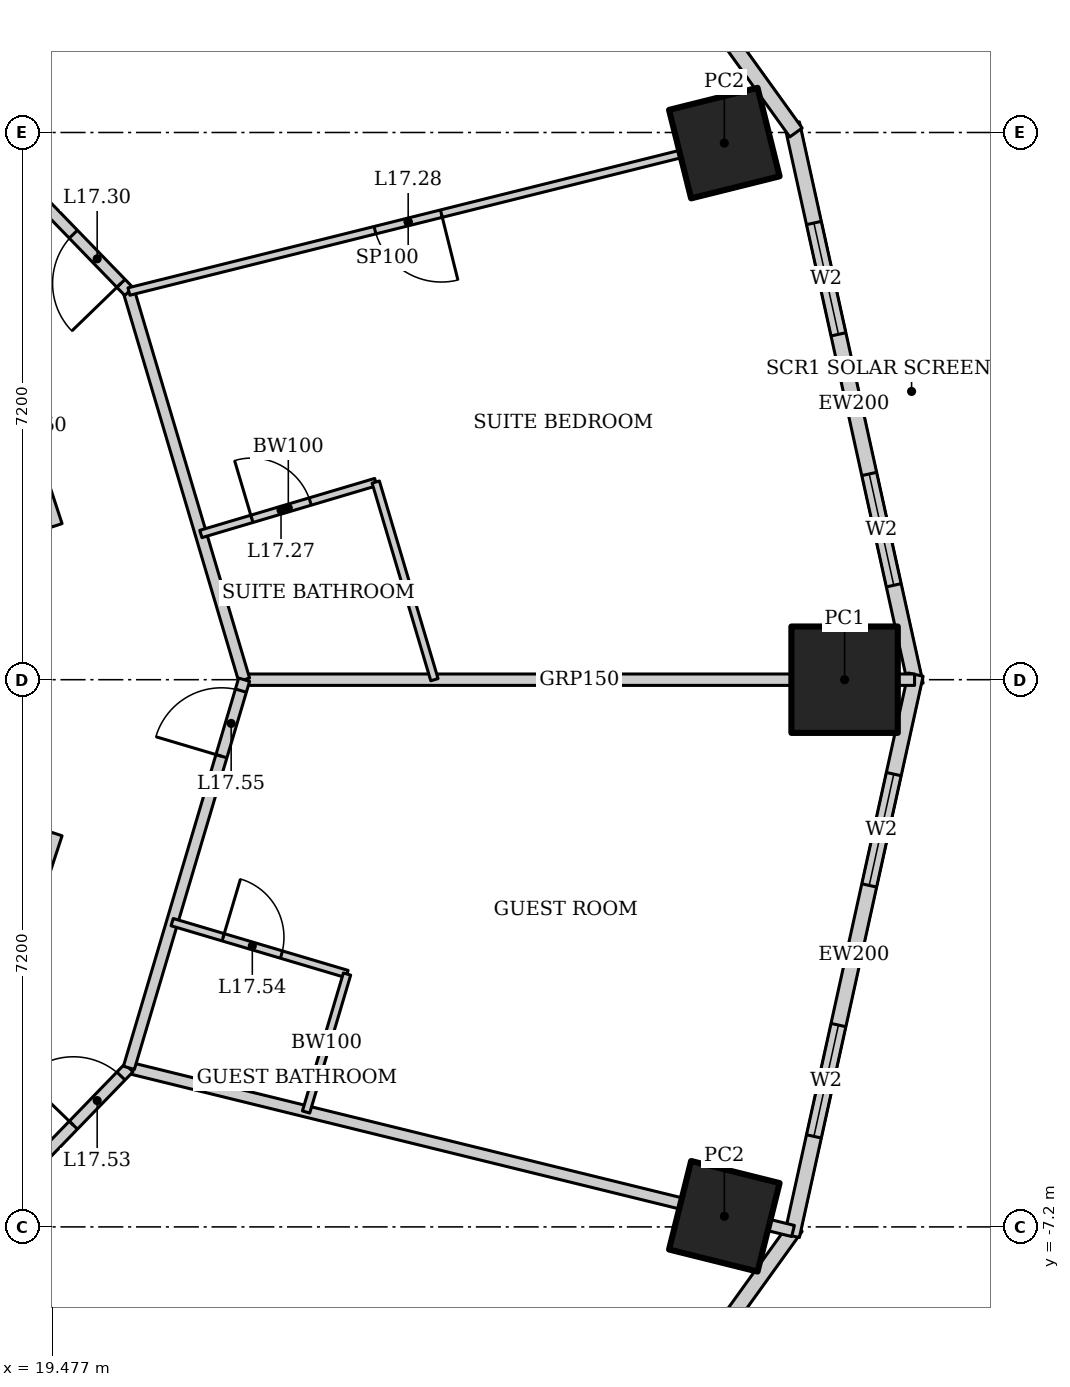
"""IFC4 building model, lengths in metres.
Left out: names, types, materials, properties, quantities, classifications, styles, units other than length and angle.
Written with IfcOpenShell. Run it as: python <this file> out.ifc"""

import sys

from ifc_helpers import new_model, si_unit, direction, frame, frame_2d, origin, origin_2d, place, context, subcontext, project, spatial, rectangle, hollow_rectangle, extrude, element, fill, save


model = new_model("IFC4")
c1 = context("Model", 3, precision=1e-05, world=origin(), true_north=direction((0.0, 1.0)))
c2 = subcontext(c1, "Body", "Model", "MODEL_VIEW")
j1 = project(units=[si_unit("LENGTHUNIT", "METRE"), si_unit("PLANEANGLEUNIT", "RADIAN")], contexts=[c1])
p1 = place(None, origin())
s1 = spatial("IfcSite", under=j1, at=p1, CompositionType="ELEMENT")
p2 = place(p1, origin())
s2 = spatial("IfcBuilding", under=s1, at=p2, CompositionType="ELEMENT")
p3 = place(p2, frame((0.0, 0.0, 76.6)))
s3 = spatial("IfcBuildingStorey", under=s2, at=p3, CompositionType="ELEMENT", Elevation=76.6)
p4 = place(p3, frame((29.9, 0.0, 0.0), z_axis=(0.0, 0.0, 1.0), x_axis=(1.0, 0.0, 0.0)))
e1 = element("IfcColumn", 1, at=p4, inside=s3, PredefinedType="COLUMN", context=c2, shape_type="SweptSolid", body=[
    extrude(hollow_rectangle(XDim=1.4, YDim=1.4, WallThickness=0.1, at=origin_2d()), origin(), (0.0, 0.0, 1.0), 3.6),
])
for number, where, z_axis, x_axis in (
    (2, (28.318, 7.06, 0.0), (0.0, 0.0, 1.0), (0.97, 0.242, 0.0)),
    (3, (28.318, -7.06, 0.0), (0.0, 0.0, 1.0), (0.242, 0.97, 0.0)),
):
    element("IfcColumn", number, at=place(p3, frame(where, z_axis=z_axis, x_axis=x_axis)), inside=s3, PredefinedType="COLUMN", context=c2, shape_type="SweptSolid", body=[
        extrude(hollow_rectangle(XDim=1.2, YDim=1.2, WallThickness=0.1, at=origin_2d()), origin(), (0.0, 0.0, 1.0), 3.6),
    ])
p5 = place(p3, frame((30.835, -0.067, 0.0), z_axis=(0.0, 0.0, 1.0), x_axis=(-0.215238065514, 0.976561608478, 0.0)))
e4 = element("IfcWall", 4, at=p5, inside=s3, PredefinedType="SOLIDWALL", context=c2, shape_type="SweptSolid", body=[
    extrude(rectangle(XDim=7.562, YDim=0.2, at=frame_2d((3.781, 0.0))), origin(), (0.0, 0.0, 1.0), 3.45),
])
p6 = place(p5, frame((1.341, 0.0, 0.5)))
e5 = element("IfcOpeningElement", 5, at=p6, cuts=e4, PredefinedType="OPENING", context=c2, shape_type="SweptSolid", body=[
    extrude(rectangle(XDim=1.5, YDim=2.2, at=frame_2d((0.75, 1.1))), frame((0.0, 0.11, 0.0), z_axis=(0.0, -1.0, 0.0), x_axis=(1.0, 0.0, 0.0)), (0.0, 0.0, 1.0), 0.22),
])
p7 = place(p5, frame((4.722, 0.0, 0.5)))
e6 = element("IfcOpeningElement", 6, at=p7, cuts=e4, PredefinedType="OPENING", context=c2, shape_type="SweptSolid", body=[
    extrude(rectangle(XDim=1.5, YDim=2.2, at=frame_2d((0.75, 1.1))), frame((0.0, 0.11, 0.0), z_axis=(0.0, -1.0, 0.0), x_axis=(1.0, 0.0, 0.0)), (0.0, 0.0, 1.0), 0.22),
])
p8 = place(p3, frame((29.26, 7.2, 0.0), z_axis=(0.0, 0.0, 1.0), x_axis=(-0.583937613703, 0.811798536155, 0.0)))
e7 = element("IfcWall", 7, at=p8, inside=s3, PredefinedType="SOLIDWALL", context=c2, shape_type="SweptSolid", body=[
    extrude(rectangle(XDim=8.323, YDim=0.2, at=frame_2d((4.162, 0.0))), origin(), (0.0, 0.0, 1.0), 3.45),
])
p9 = place(p8, frame((1.531, 0.0, 0.5)))
e8 = element("IfcOpeningElement", 8, at=p9, cuts=e7, PredefinedType="OPENING", context=c2, shape_type="SweptSolid", body=[
    extrude(rectangle(XDim=1.5, YDim=2.2, at=frame_2d((0.75, 1.1))), frame((0.0, 0.11, 0.0), z_axis=(0.0, -1.0, 0.0), x_axis=(1.0, 0.0, 0.0)), (0.0, 0.0, 1.0), 0.22),
])
p10 = place(p8, frame((5.292, 0.0, 0.5)))
e9 = element("IfcOpeningElement", 9, at=p10, cuts=e7, PredefinedType="OPENING", context=c2, shape_type="SweptSolid", body=[
    extrude(rectangle(XDim=1.5, YDim=2.2, at=frame_2d((0.75, 1.1))), frame((0.0, 0.11, 0.0), z_axis=(0.0, -1.0, 0.0), x_axis=(1.0, 0.0, 0.0)), (0.0, 0.0, 1.0), 0.22),
])
p11 = place(p3, frame((24.4, -13.957, 0.0), z_axis=(0.0, 0.0, 1.0), x_axis=(0.583937613703, 0.811798536155, 0.0)))
e10 = element("IfcWall", 10, at=p11, inside=s3, PredefinedType="SOLIDWALL", context=c2, shape_type="SweptSolid", body=[
    extrude(rectangle(XDim=8.323, YDim=0.2, at=frame_2d((4.162, 0.0))), origin(), (0.0, 0.0, 1.0), 3.45),
])
p12 = place(p11, frame((1.531, 0.0, 0.5)))
e11 = element("IfcOpeningElement", 11, at=p12, cuts=e10, PredefinedType="OPENING", context=c2, shape_type="SweptSolid", body=[
    extrude(rectangle(XDim=1.5, YDim=2.2, at=frame_2d((0.75, 1.1))), frame((0.0, 0.11, 0.0), z_axis=(0.0, -1.0, 0.0), x_axis=(1.0, 0.0, 0.0)), (0.0, 0.0, 1.0), 0.22),
])
p13 = place(p11, frame((5.292, 0.0, 0.5)))
e12 = element("IfcOpeningElement", 12, at=p13, cuts=e10, PredefinedType="OPENING", context=c2, shape_type="SweptSolid", body=[
    extrude(rectangle(XDim=1.5, YDim=2.2, at=frame_2d((0.75, 1.1))), frame((0.0, 0.11, 0.0), z_axis=(0.0, -1.0, 0.0), x_axis=(1.0, 0.0, 0.0)), (0.0, 0.0, 1.0), 0.22),
])
p14 = place(p3, frame((29.208, -7.318, 0.0), z_axis=(0.0, 0.0, 1.0), x_axis=(0.215238065514, 0.976561608478, 0.0)))
e13 = element("IfcWall", 13, at=p14, inside=s3, PredefinedType="SOLIDWALL", context=c2, shape_type="SweptSolid", body=[
    extrude(rectangle(XDim=7.562, YDim=0.2, at=frame_2d((3.781, 0.0))), origin(), (0.0, 0.0, 1.0), 3.45),
])
p15 = place(p14, frame((1.341, 0.0, 0.5)))
e14 = element("IfcOpeningElement", 14, at=p15, cuts=e13, PredefinedType="OPENING", context=c2, shape_type="SweptSolid", body=[
    extrude(rectangle(XDim=1.5, YDim=2.2, at=frame_2d((0.75, 1.1))), frame((0.0, 0.11, 0.0), z_axis=(0.0, -1.0, 0.0), x_axis=(1.0, 0.0, 0.0)), (0.0, 0.0, 1.0), 0.22),
])
p16 = place(p14, frame((4.722, 0.0, 0.5)))
e15 = element("IfcOpeningElement", 15, at=p16, cuts=e13, PredefinedType="OPENING", context=c2, shape_type="SweptSolid", body=[
    extrude(rectangle(XDim=1.5, YDim=2.2, at=frame_2d((0.75, 1.1))), frame((0.0, 0.11, 0.0), z_axis=(0.0, -1.0, 0.0), x_axis=(1.0, 0.0, 0.0)), (0.0, 0.0, 1.0), 0.22),
])
p17 = place(p3, frame((30.821, 0.0, 0.0), z_axis=(0.0, 0.0, 1.0), x_axis=(-1.0, 0.0, 0.0)))
e16 = element("IfcWall", 16, at=p17, inside=s3, PredefinedType="PARTITIONING", context=c2, shape_type="SweptSolid", body=[
    extrude(rectangle(XDim=8.821, YDim=0.15, at=frame_2d((4.41, 0.0))), origin(), (0.0, 0.0, 1.0), 2.528),
])
p18 = place(p3, frame((29.222, -7.254, 0.0), z_axis=(0.0, 0.0, 1.0), x_axis=(-0.971128703136, 0.238556160989, 0.0)))
e17 = element("IfcWall", 17, at=p18, inside=s3, PredefinedType="PARTITIONING", context=c2, shape_type="SweptSolid", body=[
    extrude(rectangle(XDim=8.998, YDim=0.15, at=frame_2d((4.499, 0.0))), origin(), (0.0, 0.0, 1.0), 2.332),
])
p19 = place(p3, frame((22.0, 0.0, 0.0), z_axis=(0.0, 0.0, 1.0), x_axis=(-0.284584469409, 0.95865096869, 0.0)))
e18 = element("IfcWall", 18, at=p19, inside=s3, PredefinedType="PARTITIONING", context=c2, shape_type="SweptSolid", body=[
    extrude(rectangle(XDim=5.327, YDim=0.15, at=frame_2d((2.664, 0.0))), origin(), (0.0, 0.0, 1.0), 3.45),
])
p20 = place(p3, frame((20.484, 5.107, 0.0), z_axis=(0.0, 0.0, 1.0), x_axis=(-0.695871090686, 0.71816671125, 0.0)))
e19 = element("IfcWall", 19, at=p20, inside=s3, PredefinedType="PARTITIONING", context=c2, shape_type="SweptSolid", body=[
    extrude(rectangle(XDim=5.913, YDim=0.15, at=frame_2d((2.957, 0.0))), origin(), (0.0, 0.0, 1.0), 3.45),
])
p21 = place(p20, frame((0.15, 0.0, 0.0)))
e20 = element("IfcOpeningElement", 20, at=p21, cuts=e19, PredefinedType="OPENING", context=c2, shape_type="SweptSolid", body=[
    extrude(rectangle(XDim=0.9, YDim=2.1, at=frame_2d((0.45, 1.05))), frame((0.0, 0.085, 0.0), z_axis=(0.0, -1.0, 0.0), x_axis=(1.0, 0.0, 0.0)), (0.0, 0.0, 1.0), 0.17),
])
p22 = place(p3, frame((16.369, -9.354, 0.0), z_axis=(0.0, 0.0, 1.0), x_axis=(0.695871090686, 0.71816671125, 0.0)))
e21 = element("IfcWall", 21, at=p22, inside=s3, PredefinedType="PARTITIONING", context=c2, shape_type="SweptSolid", body=[
    extrude(rectangle(XDim=5.913, YDim=0.15, at=frame_2d((2.957, 0.0))), origin(), (0.0, 0.0, 1.0), 3.45),
])
p23 = place(p22, frame((4.863, 0.0, 0.0)))
e22 = element("IfcOpeningElement", 22, at=p23, cuts=e21, PredefinedType="OPENING", context=c2, shape_type="SweptSolid", body=[
    extrude(rectangle(XDim=0.9, YDim=2.1, at=frame_2d((0.45, 1.05))), frame((0.0, 0.085, 0.0), z_axis=(0.0, -1.0, 0.0), x_axis=(1.0, 0.0, 0.0)), (0.0, 0.0, 1.0), 0.17),
])
p24 = place(p3, frame((20.484, -5.107, 0.0), z_axis=(0.0, 0.0, 1.0), x_axis=(0.284584469409, 0.95865096869, 0.0)))
e23 = element("IfcWall", 23, at=p24, inside=s3, PredefinedType="PARTITIONING", context=c2, shape_type="SweptSolid", body=[
    extrude(rectangle(XDim=5.327, YDim=0.15, at=frame_2d((2.664, 0.0))), origin(), (0.0, 0.0, 1.0), 3.45),
])
p25 = place(p24, frame((4.278, 0.0, 0.0)))
e24 = element("IfcOpeningElement", 24, at=p25, cuts=e23, PredefinedType="OPENING", context=c2, shape_type="SweptSolid", body=[
    extrude(rectangle(XDim=0.9, YDim=2.1, at=frame_2d((0.45, 1.05))), frame((0.0, 0.085, 0.0), z_axis=(0.0, -1.0, 0.0), x_axis=(1.0, 0.0, 0.0)), (0.0, 0.0, 1.0), 0.17),
])
p26 = place(p3, frame((21.431, 1.917, 0.0), z_axis=(0.0, 0.0, 1.0), x_axis=(0.958639927723, 0.284621659356, 0.0)))
e25 = element("IfcWall", 25, at=p26, inside=s3, PredefinedType="PARTITIONING", context=c2, shape_type="SweptSolid", body=[
    extrude(rectangle(XDim=2.4, YDim=0.1, at=frame_2d((1.2, 0.0))), origin(), (0.0, 0.0, 1.0), 3.45),
])
p27 = place(p26, frame((0.7, 0.0, 0.0)))
e26 = element("IfcOpeningElement", 26, at=p27, cuts=e25, PredefinedType="OPENING", context=c2, shape_type="SweptSolid", body=[
    extrude(rectangle(XDim=0.8, YDim=2.1, at=frame_2d((0.4, 1.05))), frame((0.0, 0.06, 0.0), z_axis=(0.0, -1.0, 0.0), x_axis=(1.0, 0.0, 0.0)), (0.0, 0.0, 1.0), 0.12),
])
p28 = place(p3, frame((23.732, 2.6, 0.0), z_axis=(0.0, 0.0, 1.0), x_axis=(0.284514277473, -0.958671803025, 0.0)))
e27 = element("IfcWall", 27, at=p28, inside=s3, PredefinedType="PARTITIONING", context=c2, shape_type="SweptSolid", body=[
    extrude(rectangle(XDim=2.712, YDim=0.1, at=frame_2d((1.356, 0.0))), origin(), (0.0, 0.0, 1.0), 3.45),
])
p29 = place(p3, frame((27.833, 6.939, 0.0), z_axis=(0.0, 0.0, 1.0), x_axis=(-0.970295894358, -0.24192122146, 0.0)))
e28 = element("IfcWall", 28, at=p29, inside=s3, PredefinedType="PARTITIONING", context=c2, shape_type="SweptSolid", body=[
    extrude(rectangle(XDim=7.574, YDim=0.1, at=frame_2d((3.787, 0.0))), origin(), (0.0, 0.0, 1.0), 2.332),
])
p30 = place(p29, frame((3.337, 0.0, 0.0)))
e29 = element("IfcOpeningElement", 29, at=p30, cuts=e28, PredefinedType="OPENING", context=c2, shape_type="SweptSolid", body=[
    extrude(rectangle(XDim=0.9, YDim=2.1, at=frame_2d((0.45, 1.05))), frame((0.0, 0.06, 0.0), z_axis=(0.0, -1.0, 0.0), x_axis=(1.0, 0.0, 0.0)), (0.0, 0.0, 1.0), 0.12),
])
p31 = place(p3, frame((21.053, -3.19, 0.0), z_axis=(0.0, 0.0, 1.0), x_axis=(0.958667679126, -0.284528172593, 0.0)))
e30 = element("IfcWall", 30, at=p31, inside=s3, PredefinedType="PARTITIONING", context=c2, shape_type="SweptSolid", body=[
    extrude(rectangle(XDim=2.4, YDim=0.1, at=frame_2d((1.2, 0.0))), origin(), (0.0, 0.0, 1.0), 3.45),
])
p32 = place(p31, frame((0.7, 0.0, 0.0)))
e31 = element("IfcOpeningElement", 31, at=p32, cuts=e30, PredefinedType="OPENING", context=c2, shape_type="SweptSolid", body=[
    extrude(rectangle(XDim=0.8, YDim=2.1, at=frame_2d((0.4, 1.05))), frame((0.0, 0.06, 0.0), z_axis=(0.0, -1.0, 0.0), x_axis=(1.0, 0.0, 0.0)), (0.0, 0.0, 1.0), 0.12),
])
p33 = place(p3, frame((23.354, -3.873, 0.0), z_axis=(0.0, 0.0, 1.0), x_axis=(-0.284496480535, -0.958677084613, 0.0)))
e32 = element("IfcWall", 32, at=p33, inside=s3, PredefinedType="PARTITIONING", context=c2, shape_type="SweptSolid", body=[
    extrude(rectangle(XDim=1.894, YDim=0.1, at=frame_2d((0.947, 0.0))), origin(), (0.0, 0.0, 1.0), 3.45),
])
for number, where, z_axis, x_axis in (
    (33, (19.533, 2.03, 0.0), (0.0, 0.0, 1.0), (-0.312, 0.95, 0.0)),
    (34, (18.672, -4.655, 0.0), (0.0, 0.0, 1.0), (0.312, 0.95, 0.0)),
):
    element("IfcWall", number, at=place(p3, frame(where, z_axis=z_axis, x_axis=x_axis)), inside=s3, PredefinedType="PARTITIONING", context=c2, shape_type="SweptSolid", body=[
        extrude(rectangle(XDim=2.763, YDim=0.15, at=frame_2d((1.381, 0.0))), origin(), (0.0, 0.0, 1.0), 3.45),
    ])
p34 = place(p6, origin())
e35 = element("IfcWindow", 35, at=p34, inside=s3, PartitioningType="SINGLE_PANEL", PredefinedType="WINDOW", context=c2, shape_type="SweptSolid", body=[
    extrude(rectangle(XDim=1.5, YDim=2.2, at=frame_2d((0.75, 1.1))), frame((0.0, 0.03, 0.0), z_axis=(0.0, -1.0, 0.0), x_axis=(1.0, 0.0, 0.0)), (0.0, 0.0, 1.0), 0.06),
])
fill(e5, e35)
p35 = place(p7, origin())
e36 = element("IfcWindow", 36, at=p35, inside=s3, PartitioningType="SINGLE_PANEL", PredefinedType="WINDOW", context=c2, shape_type="SweptSolid", body=[
    extrude(rectangle(XDim=1.5, YDim=2.2, at=frame_2d((0.75, 1.1))), frame((0.0, 0.03, 0.0), z_axis=(0.0, -1.0, 0.0), x_axis=(1.0, 0.0, 0.0)), (0.0, 0.0, 1.0), 0.06),
])
fill(e6, e36)
p36 = place(p15, origin())
e37 = element("IfcWindow", 37, at=p36, inside=s3, PartitioningType="SINGLE_PANEL", PredefinedType="WINDOW", context=c2, shape_type="SweptSolid", body=[
    extrude(rectangle(XDim=1.5, YDim=2.2, at=frame_2d((0.75, 1.1))), frame((0.0, 0.03, 0.0), z_axis=(0.0, -1.0, 0.0), x_axis=(1.0, 0.0, 0.0)), (0.0, 0.0, 1.0), 0.06),
])
fill(e14, e37)
p37 = place(p16, origin())
e38 = element("IfcWindow", 38, at=p37, inside=s3, PartitioningType="SINGLE_PANEL", PredefinedType="WINDOW", context=c2, shape_type="SweptSolid", body=[
    extrude(rectangle(XDim=1.5, YDim=2.2, at=frame_2d((0.75, 1.1))), frame((0.0, 0.03, 0.0), z_axis=(0.0, -1.0, 0.0), x_axis=(1.0, 0.0, 0.0)), (0.0, 0.0, 1.0), 0.06),
])
fill(e15, e38)
p38 = place(p27, origin())
e39 = element("IfcDoor", 39, at=p38, inside=s3, OperationType="SINGLE_SWING_LEFT", PredefinedType="DOOR", context=c2, shape_type="SweptSolid", body=[
    extrude(rectangle(XDim=0.8, YDim=2.1, at=frame_2d((0.4, 1.05))), frame((0.0, 0.025, 0.0), z_axis=(0.0, -1.0, 0.0), x_axis=(1.0, 0.0, 0.0)), (0.0, 0.0, 1.0), 0.05),
])
fill(e26, e39)
p39 = place(p30, origin())
e40 = element("IfcDoor", 40, at=p39, inside=s3, OperationType="SINGLE_SWING_LEFT", PredefinedType="DOOR", context=c2, shape_type="SweptSolid", body=[
    extrude(rectangle(XDim=0.9, YDim=2.1, at=frame_2d((0.45, 1.05))), frame((0.0, 0.025, 0.0), z_axis=(0.0, -1.0, 0.0), x_axis=(1.0, 0.0, 0.0)), (0.0, 0.0, 1.0), 0.05),
])
fill(e29, e40)
p40 = place(p21, origin())
e41 = element("IfcDoor", 41, at=p40, inside=s3, OperationType="SINGLE_SWING_LEFT", PredefinedType="DOOR", context=c2, shape_type="SweptSolid", body=[
    extrude(rectangle(XDim=0.9, YDim=2.1, at=frame_2d((0.45, 1.05))), frame((0.0, 0.025, 0.0), z_axis=(0.0, -1.0, 0.0), x_axis=(1.0, 0.0, 0.0)), (0.0, 0.0, 1.0), 0.05),
])
fill(e20, e41)
p41 = place(p23, origin())
e42 = element("IfcDoor", 42, at=p41, inside=s3, OperationType="SINGLE_SWING_LEFT", PredefinedType="DOOR", context=c2, shape_type="SweptSolid", body=[
    extrude(rectangle(XDim=0.9, YDim=2.1, at=frame_2d((0.45, 1.05))), frame((0.0, 0.025, 0.0), z_axis=(0.0, -1.0, 0.0), x_axis=(1.0, 0.0, 0.0)), (0.0, 0.0, 1.0), 0.05),
])
fill(e22, e42)
p42 = place(p32, origin())
e43 = element("IfcDoor", 43, at=p42, inside=s3, OperationType="SINGLE_SWING_LEFT", PredefinedType="DOOR", context=c2, shape_type="SweptSolid", body=[
    extrude(rectangle(XDim=0.8, YDim=2.1, at=frame_2d((0.4, 1.05))), frame((0.0, 0.025, 0.0), z_axis=(0.0, -1.0, 0.0), x_axis=(1.0, 0.0, 0.0)), (0.0, 0.0, 1.0), 0.05),
])
fill(e31, e43)
p43 = place(p25, origin())
e44 = element("IfcDoor", 44, at=p43, inside=s3, OperationType="SINGLE_SWING_LEFT", PredefinedType="DOOR", context=c2, shape_type="SweptSolid", body=[
    extrude(rectangle(XDim=0.9, YDim=2.1, at=frame_2d((0.45, 1.05))), frame((0.0, 0.025, 0.0), z_axis=(0.0, -1.0, 0.0), x_axis=(1.0, 0.0, 0.0)), (0.0, 0.0, 1.0), 0.05),
])
fill(e24, e44)
save(model, sys.argv[1])
